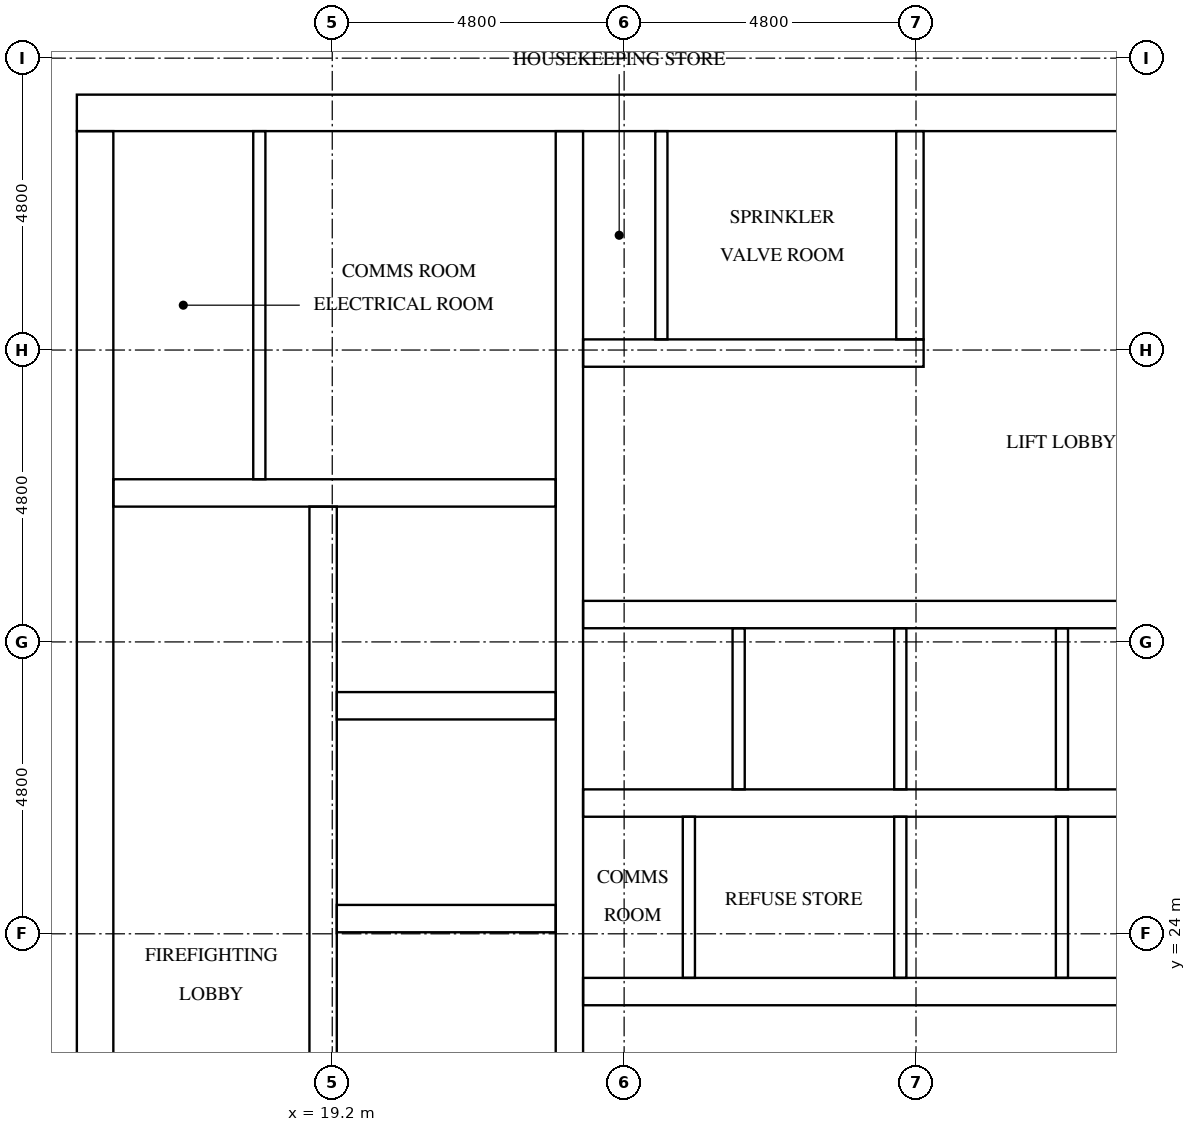
"""IFC4 building model, lengths in metres.
Left out: names, types, materials, properties, quantities, classifications, styles, units other than length and angle.
Written with IfcOpenShell. Run it as: python <this file> out.ifc"""

import sys

from ifc_helpers import new_model, si_unit, direction, frame, frame_2d, origin, place, context, subcontext, project, spatial, rectangle, extrude, element, fill, save


model = new_model("IFC4")
c1 = context("Model", 3, precision=1e-05, world=origin(), true_north=direction((0.0, 1.0)))
c2 = subcontext(c1, "Body", "Model", "MODEL_VIEW")
j1 = project(units=[si_unit("LENGTHUNIT", "METRE"), si_unit("PLANEANGLEUNIT", "RADIAN")], contexts=[c1])
p1 = place(None, origin())
s1 = spatial("IfcSite", under=j1, at=p1, CompositionType="ELEMENT")
p2 = place(p1, origin())
s2 = spatial("IfcBuilding", under=s1, at=p2, CompositionType="ELEMENT")
p3 = place(p2, frame((0.0, 0.0, 245.7)))
s3 = spatial("IfcBuildingStorey", under=s2, at=p3, CompositionType="ELEMENT", Elevation=245.7)
p4 = place(p3, frame((15.0, 37.5, 0.0), z_axis=(0.0, 0.0, 1.0), x_axis=(1.0, 0.0, 0.0)))
e1 = element("IfcWall", 1, at=p4, inside=s3, PredefinedType="SHEAR", context=c2, shape_type="SweptSolid", body=[
    extrude(rectangle(XDim=32.4, YDim=0.6, at=frame_2d((16.2, 0.0))), origin(), (0.0, 0.0, 1.0), 3.2),
])
p5 = place(p4, frame((15.3, 0.0, 0.0)))
e2 = element("IfcOpeningElement", 2, at=p5, cuts=e1, PredefinedType="OPENING", context=c2, shape_type="SweptSolid", body=[
    extrude(rectangle(XDim=1.8, YDim=2.1, at=frame_2d((0.9, 1.05))), frame((0.0, 0.31, 0.0), z_axis=(0.0, -1.0, 0.0), x_axis=(1.0, 0.0, 0.0)), (0.0, 0.0, 1.0), 0.62),
])
p6 = place(p4, frame((1.25, 0.0, 0.0)))
e3 = element("IfcOpeningElement", 3, at=p6, cuts=e1, PredefinedType="OPENING", context=c2, shape_type="SweptSolid", body=[
    extrude(rectangle(XDim=1.0, YDim=2.1, at=frame_2d((0.5, 1.05))), frame((0.0, 0.31, 0.0), z_axis=(0.0, -1.0, 0.0), x_axis=(1.0, 0.0, 0.0)), (0.0, 0.0, 1.0), 0.62),
])
p7 = place(p4, frame((4.988, 0.0, 0.0)))
e4 = element("IfcOpeningElement", 4, at=p7, cuts=e1, PredefinedType="OPENING", context=c2, shape_type="SweptSolid", body=[
    extrude(rectangle(XDim=1.0, YDim=2.1, at=frame_2d((0.5, 1.05))), frame((0.0, 0.31, 0.0), z_axis=(0.0, -1.0, 0.0), x_axis=(1.0, 0.0, 0.0)), (0.0, 0.0, 1.0), 0.62),
])
p8 = place(p3, frame((15.3, 15.6, 0.0), z_axis=(0.0, 0.0, 1.0), x_axis=(0.0, 1.0, 0.0)))
e5 = element("IfcWall", 5, at=p8, inside=s3, PredefinedType="SHEAR", context=c2, shape_type="SweptSolid", body=[
    extrude(rectangle(XDim=21.6, YDim=0.6, at=frame_2d((10.8, 0.0))), origin(), (0.0, 0.0, 1.0), 3.2),
])
p9 = place(p8, frame((5.16, 0.0, 0.0)))
e6 = element("IfcOpeningElement", 6, at=p9, cuts=e5, PredefinedType="OPENING", context=c2, shape_type="SweptSolid", body=[
    extrude(rectangle(XDim=1.2, YDim=2.1, at=frame_2d((0.6, 1.05))), frame((0.0, 0.31, 0.0), z_axis=(0.0, -1.0, 0.0), x_axis=(1.0, 0.0, 0.0)), (0.0, 0.0, 1.0), 0.62),
])
p10 = place(p3, frame((19.05, 15.6, 0.0), z_axis=(0.0, 0.0, 1.0), x_axis=(0.0, 1.0, 0.0)))
e7 = element("IfcWall", 7, at=p10, inside=s3, PredefinedType="SHEAR", context=c2, shape_type="SweptSolid", body=[
    extrude(rectangle(XDim=15.425, YDim=0.45, at=frame_2d((7.712, 0.0))), origin(), (0.0, 0.0, 1.0), 3.2),
])
p11 = place(p10, frame((9.85, 0.0, 0.0)))
e8 = element("IfcOpeningElement", 8, at=p11, cuts=e7, PredefinedType="OPENING", context=c2, shape_type="SweptSolid", body=[
    extrude(rectangle(XDim=1.1, YDim=2.1, at=frame_2d((0.55, 1.05))), frame((0.0, 0.235, 0.0), z_axis=(0.0, -1.0, 0.0), x_axis=(1.0, 0.0, 0.0)), (0.0, 0.0, 1.0), 0.47),
])
p12 = place(p10, frame((13.35, 0.0, 0.0)))
e9 = element("IfcOpeningElement", 9, at=p12, cuts=e7, PredefinedType="OPENING", context=c2, shape_type="SweptSolid", body=[
    extrude(rectangle(XDim=1.1, YDim=2.1, at=frame_2d((0.55, 1.05))), frame((0.0, 0.235, 0.0), z_axis=(0.0, -1.0, 0.0), x_axis=(1.0, 0.0, 0.0)), (0.0, 0.0, 1.0), 0.47),
])
p13 = place(p10, frame((0.6, 0.0, 0.0)))
e10 = element("IfcOpeningElement", 10, at=p13, cuts=e7, PredefinedType="OPENING", context=c2, shape_type="SweptSolid", body=[
    extrude(rectangle(XDim=1.2, YDim=2.1, at=frame_2d((0.6, 1.05))), frame((0.0, 0.235, 0.0), z_axis=(0.0, -1.0, 0.0), x_axis=(1.0, 0.0, 0.0)), (0.0, 0.0, 1.0), 0.47),
])
p14 = place(p3, frame((23.1, 15.6, 0.0), z_axis=(0.0, 0.0, 1.0), x_axis=(0.0, 1.0, 0.0)))
e11 = element("IfcWall", 11, at=p14, inside=s3, PredefinedType="SHEAR", context=c2, shape_type="SweptSolid", body=[
    extrude(rectangle(XDim=21.6, YDim=0.45, at=frame_2d((10.8, 0.0))), origin(), (0.0, 0.0, 1.0), 3.2),
])
for number, where, z_axis, x_axis in (
    (12, (19.275, 24.25, 0.0), (0.0, 0.0, 1.0), (1.0, 0.0, 0.0)),
    (13, (19.275, 27.75, 0.0), (0.0, 0.0, 1.0), (1.0, 0.0, 0.0)),
):
    element("IfcWall", number, at=place(p3, frame(where, z_axis=z_axis, x_axis=x_axis)), inside=s3, PredefinedType="SHEAR", context=c2, shape_type="SweptSolid", body=[
        extrude(rectangle(XDim=3.6, YDim=0.45, at=frame_2d((1.8, 0.0))), origin(), (0.0, 0.0, 1.0), 3.2),
    ])
p15 = place(p3, frame((15.6, 31.25, 0.0), z_axis=(0.0, 0.0, 1.0), x_axis=(1.0, 0.0, 0.0)))
e14 = element("IfcWall", 14, at=p15, inside=s3, PredefinedType="SHEAR", context=c2, shape_type="SweptSolid", body=[
    extrude(rectangle(XDim=7.275, YDim=0.45, at=frame_2d((3.637, 0.0))), origin(), (0.0, 0.0, 1.0), 3.2),
])
p16 = place(p3, frame((23.325, 23.05, 0.0), z_axis=(0.0, 0.0, 1.0), x_axis=(1.0, 0.0, 0.0)))
e15 = element("IfcWall", 15, at=p16, inside=s3, PredefinedType="SHEAR", context=c2, shape_type="SweptSolid", body=[
    extrude(rectangle(XDim=15.75, YDim=0.45, at=frame_2d((7.875, 0.0))), origin(), (0.0, 0.0, 1.0), 3.2),
])
p17 = place(p16, frame((0.32, 0.0, 0.0)))
e16 = element("IfcOpeningElement", 16, at=p17, cuts=e15, PredefinedType="OPENING", context=c2, shape_type="SweptSolid", body=[
    extrude(rectangle(XDim=1.0, YDim=2.1, at=frame_2d((0.5, 1.05))), frame((0.0, 0.235, 0.0), z_axis=(0.0, -1.0, 0.0), x_axis=(1.0, 0.0, 0.0)), (0.0, 0.0, 1.0), 0.47),
])
p18 = place(p16, frame((2.978, 0.0, 0.0)))
e17 = element("IfcOpeningElement", 17, at=p18, cuts=e15, PredefinedType="OPENING", context=c2, shape_type="SweptSolid", body=[
    extrude(rectangle(XDim=1.0, YDim=2.1, at=frame_2d((0.5, 1.05))), frame((0.0, 0.235, 0.0), z_axis=(0.0, -1.0, 0.0), x_axis=(1.0, 0.0, 0.0)), (0.0, 0.0, 1.0), 0.47),
])
p19 = place(p16, frame((10.953, 0.0, 0.0)))
e18 = element("IfcOpeningElement", 18, at=p19, cuts=e15, PredefinedType="OPENING", context=c2, shape_type="SweptSolid", body=[
    extrude(rectangle(XDim=1.0, YDim=2.1, at=frame_2d((0.5, 1.05))), frame((0.0, 0.235, 0.0), z_axis=(0.0, -1.0, 0.0), x_axis=(1.0, 0.0, 0.0)), (0.0, 0.0, 1.0), 0.47),
])
p20 = place(p16, frame((13.612, 0.0, 0.0)))
e19 = element("IfcOpeningElement", 19, at=p20, cuts=e15, PredefinedType="OPENING", context=c2, shape_type="SweptSolid", body=[
    extrude(rectangle(XDim=1.0, YDim=2.1, at=frame_2d((0.5, 1.05))), frame((0.0, 0.235, 0.0), z_axis=(0.0, -1.0, 0.0), x_axis=(1.0, 0.0, 0.0)), (0.0, 0.0, 1.0), 0.47),
])
p21 = place(p3, frame((23.325, 26.15, 0.0), z_axis=(0.0, 0.0, 1.0), x_axis=(1.0, 0.0, 0.0)))
e20 = element("IfcWall", 20, at=p21, inside=s3, PredefinedType="SHEAR", context=c2, shape_type="SweptSolid", body=[
    extrude(rectangle(XDim=15.75, YDim=0.45, at=frame_2d((7.875, 0.0))), origin(), (0.0, 0.0, 1.0), 3.2),
])
p22 = place(p3, frame((23.325, 29.25, 0.0), z_axis=(0.0, 0.0, 1.0), x_axis=(1.0, 0.0, 0.0)))
e21 = element("IfcWall", 21, at=p22, inside=s3, PredefinedType="SHEAR", context=c2, shape_type="SweptSolid", body=[
    extrude(rectangle(XDim=15.75, YDim=0.45, at=frame_2d((7.875, 0.0))), origin(), (0.0, 0.0, 1.0), 3.2),
])
p23 = place(p22, frame((0.679, 0.0, 0.0)))
e22 = element("IfcOpeningElement", 22, at=p23, cuts=e21, PredefinedType="OPENING", context=c2, shape_type="SweptSolid", body=[
    extrude(rectangle(XDim=1.1, YDim=2.1, at=frame_2d((0.55, 1.05))), frame((0.0, 0.235, 0.0), z_axis=(0.0, -1.0, 0.0), x_axis=(1.0, 0.0, 0.0)), (0.0, 0.0, 1.0), 0.47),
])
p24 = place(p22, frame((3.337, 0.0, 0.0)))
e23 = element("IfcOpeningElement", 23, at=p24, cuts=e21, PredefinedType="OPENING", context=c2, shape_type="SweptSolid", body=[
    extrude(rectangle(XDim=1.1, YDim=2.1, at=frame_2d((0.55, 1.05))), frame((0.0, 0.235, 0.0), z_axis=(0.0, -1.0, 0.0), x_axis=(1.0, 0.0, 0.0)), (0.0, 0.0, 1.0), 0.47),
])
p25 = place(p22, frame((5.996, 0.0, 0.0)))
e24 = element("IfcOpeningElement", 24, at=p25, cuts=e21, PredefinedType="OPENING", context=c2, shape_type="SweptSolid", body=[
    extrude(rectangle(XDim=1.1, YDim=2.1, at=frame_2d((0.55, 1.05))), frame((0.0, 0.235, 0.0), z_axis=(0.0, -1.0, 0.0), x_axis=(1.0, 0.0, 0.0)), (0.0, 0.0, 1.0), 0.47),
])
p26 = place(p22, frame((8.654, 0.0, 0.0)))
e25 = element("IfcOpeningElement", 25, at=p26, cuts=e21, PredefinedType="OPENING", context=c2, shape_type="SweptSolid", body=[
    extrude(rectangle(XDim=1.1, YDim=2.1, at=frame_2d((0.55, 1.05))), frame((0.0, 0.235, 0.0), z_axis=(0.0, -1.0, 0.0), x_axis=(1.0, 0.0, 0.0)), (0.0, 0.0, 1.0), 0.47),
])
p27 = place(p22, frame((11.312, 0.0, 0.0)))
e26 = element("IfcOpeningElement", 26, at=p27, cuts=e21, PredefinedType="OPENING", context=c2, shape_type="SweptSolid", body=[
    extrude(rectangle(XDim=1.1, YDim=2.1, at=frame_2d((0.55, 1.05))), frame((0.0, 0.235, 0.0), z_axis=(0.0, -1.0, 0.0), x_axis=(1.0, 0.0, 0.0)), (0.0, 0.0, 1.0), 0.47),
])
p28 = place(p22, frame((13.971, 0.0, 0.0)))
e27 = element("IfcOpeningElement", 27, at=p28, cuts=e21, PredefinedType="OPENING", context=c2, shape_type="SweptSolid", body=[
    extrude(rectangle(XDim=1.1, YDim=2.1, at=frame_2d((0.55, 1.05))), frame((0.0, 0.235, 0.0), z_axis=(0.0, -1.0, 0.0), x_axis=(1.0, 0.0, 0.0)), (0.0, 0.0, 1.0), 0.47),
])
p29 = place(p3, frame((23.325, 33.55, 0.0), z_axis=(0.0, 0.0, 1.0), x_axis=(1.0, 0.0, 0.0)))
e28 = element("IfcWall", 28, at=p29, inside=s3, PredefinedType="SHEAR", context=c2, shape_type="SweptSolid", body=[
    extrude(rectangle(XDim=5.6, YDim=0.45, at=frame_2d((2.8, 0.0))), origin(), (0.0, 0.0, 1.0), 3.2),
])
p30 = place(p29, frame((0.094, 0.0, 0.0)))
e29 = element("IfcOpeningElement", 29, at=p30, cuts=e28, PredefinedType="OPENING", context=c2, shape_type="SweptSolid", body=[
    extrude(rectangle(XDim=1.0, YDim=2.1, at=frame_2d((0.5, 1.05))), frame((0.0, 0.235, 0.0), z_axis=(0.0, -1.0, 0.0), x_axis=(1.0, 0.0, 0.0)), (0.0, 0.0, 1.0), 0.47),
])
p31 = place(p29, frame((2.769, 0.0, 0.0)))
e30 = element("IfcOpeningElement", 30, at=p31, cuts=e28, PredefinedType="OPENING", context=c2, shape_type="SweptSolid", body=[
    extrude(rectangle(XDim=1.0, YDim=2.1, at=frame_2d((0.5, 1.05))), frame((0.0, 0.235, 0.0), z_axis=(0.0, -1.0, 0.0), x_axis=(1.0, 0.0, 0.0)), (0.0, 0.0, 1.0), 0.47),
])
p32 = place(p3, frame((28.7, 33.775, 0.0), z_axis=(0.0, 0.0, 1.0), x_axis=(0.0, 1.0, 0.0)))
e31 = element("IfcWall", 31, at=p32, inside=s3, PredefinedType="SHEAR", context=c2, shape_type="SweptSolid", body=[
    extrude(rectangle(XDim=3.425, YDim=0.45, at=frame_2d((1.712, 0.0))), origin(), (0.0, 0.0, 1.0), 3.2),
])
p33 = place(p3, frame((25.883, 26.375, 0.0), z_axis=(0.0, 0.0, 1.0), x_axis=(0.0, 1.0, 0.0)))
e32 = element("IfcWall", 32, at=p33, inside=s3, PredefinedType="SOLIDWALL", context=c2, shape_type="SweptSolid", body=[
    extrude(rectangle(XDim=2.65, YDim=0.2, at=frame_2d((1.325, 0.0))), origin(), (0.0, 0.0, 1.0), 3.2),
])
p34 = place(p3, frame((28.542, 23.275, 0.0), z_axis=(0.0, 0.0, 1.0), x_axis=(0.0, 1.0, 0.0)))
e33 = element("IfcWall", 33, at=p34, inside=s3, PredefinedType="SOLIDWALL", context=c2, shape_type="SweptSolid", body=[
    extrude(rectangle(XDim=2.65, YDim=0.2, at=frame_2d((1.325, 0.0))), origin(), (0.0, 0.0, 1.0), 3.2),
])
p35 = place(p3, frame((28.542, 26.375, 0.0), z_axis=(0.0, 0.0, 1.0), x_axis=(0.0, 1.0, 0.0)))
e34 = element("IfcWall", 34, at=p35, inside=s3, PredefinedType="SOLIDWALL", context=c2, shape_type="SweptSolid", body=[
    extrude(rectangle(XDim=2.65, YDim=0.2, at=frame_2d((1.325, 0.0))), origin(), (0.0, 0.0, 1.0), 3.2),
])
p36 = place(p3, frame((31.2, 23.275, 0.0), z_axis=(0.0, 0.0, 1.0), x_axis=(0.0, 1.0, 0.0)))
e35 = element("IfcWall", 35, at=p36, inside=s3, PredefinedType="SOLIDWALL", context=c2, shape_type="SweptSolid", body=[
    extrude(rectangle(XDim=2.65, YDim=0.2, at=frame_2d((1.325, 0.0))), origin(), (0.0, 0.0, 1.0), 3.2),
])
p37 = place(p3, frame((31.2, 26.375, 0.0), z_axis=(0.0, 0.0, 1.0), x_axis=(0.0, 1.0, 0.0)))
e36 = element("IfcWall", 36, at=p37, inside=s3, PredefinedType="SOLIDWALL", context=c2, shape_type="SweptSolid", body=[
    extrude(rectangle(XDim=2.65, YDim=0.2, at=frame_2d((1.325, 0.0))), origin(), (0.0, 0.0, 1.0), 3.2),
])
p38 = place(p3, frame((18.001, 31.475, 0.0), z_axis=(0.0, 0.0, 1.0), x_axis=(0.0, 1.0, 0.0)))
e37 = element("IfcWall", 37, at=p38, inside=s3, PredefinedType="PARTITIONING", context=c2, shape_type="SweptSolid", body=[
    extrude(rectangle(XDim=5.725, YDim=0.2, at=frame_2d((2.862, 0.0))), origin(), (0.0, 0.0, 1.0), 3.2),
])
p39 = place(p3, frame((25.065, 23.275, 0.0), z_axis=(0.0, 0.0, 1.0), x_axis=(0.0, 1.0, 0.0)))
e38 = element("IfcWall", 38, at=p39, inside=s3, PredefinedType="PARTITIONING", context=c2, shape_type="SweptSolid", body=[
    extrude(rectangle(XDim=2.65, YDim=0.2, at=frame_2d((1.325, 0.0))), origin(), (0.0, 0.0, 1.0), 3.2),
])
p40 = place(p3, frame((24.613, 33.775, 0.0), z_axis=(0.0, 0.0, 1.0), x_axis=(0.0, 1.0, 0.0)))
e39 = element("IfcWall", 39, at=p40, inside=s3, PredefinedType="PARTITIONING", context=c2, shape_type="SweptSolid", body=[
    extrude(rectangle(XDim=3.425, YDim=0.2, at=frame_2d((1.712, 0.0))), origin(), (0.0, 0.0, 1.0), 3.2),
])
p41 = place(p23, origin())
e40 = element("IfcDoor", 40, at=p41, inside=s3, OperationType="DOUBLE_DOOR_SLIDING", PredefinedType="DOOR", context=c2, shape_type="SweptSolid", body=[
    extrude(rectangle(XDim=1.1, YDim=2.1, at=frame_2d((0.55, 1.05))), frame((0.0, 0.025, 0.0), z_axis=(0.0, -1.0, 0.0), x_axis=(1.0, 0.0, 0.0)), (0.0, 0.0, 1.0), 0.05),
])
fill(e22, e40)
p42 = place(p24, origin())
e41 = element("IfcDoor", 41, at=p42, inside=s3, OperationType="DOUBLE_DOOR_SLIDING", PredefinedType="DOOR", context=c2, shape_type="SweptSolid", body=[
    extrude(rectangle(XDim=1.1, YDim=2.1, at=frame_2d((0.55, 1.05))), frame((0.0, 0.025, 0.0), z_axis=(0.0, -1.0, 0.0), x_axis=(1.0, 0.0, 0.0)), (0.0, 0.0, 1.0), 0.05),
])
fill(e23, e41)
p43 = place(p25, origin())
e42 = element("IfcDoor", 42, at=p43, inside=s3, OperationType="DOUBLE_DOOR_SLIDING", PredefinedType="DOOR", context=c2, shape_type="SweptSolid", body=[
    extrude(rectangle(XDim=1.1, YDim=2.1, at=frame_2d((0.55, 1.05))), frame((0.0, 0.025, 0.0), z_axis=(0.0, -1.0, 0.0), x_axis=(1.0, 0.0, 0.0)), (0.0, 0.0, 1.0), 0.05),
])
fill(e24, e42)
p44 = place(p26, origin())
e43 = element("IfcDoor", 43, at=p44, inside=s3, OperationType="DOUBLE_DOOR_SLIDING", PredefinedType="DOOR", context=c2, shape_type="SweptSolid", body=[
    extrude(rectangle(XDim=1.1, YDim=2.1, at=frame_2d((0.55, 1.05))), frame((0.0, 0.025, 0.0), z_axis=(0.0, -1.0, 0.0), x_axis=(1.0, 0.0, 0.0)), (0.0, 0.0, 1.0), 0.05),
])
fill(e25, e43)
p45 = place(p11, origin())
e44 = element("IfcDoor", 44, at=p45, inside=s3, OperationType="DOUBLE_DOOR_SLIDING", PredefinedType="DOOR", context=c2, shape_type="SweptSolid", body=[
    extrude(rectangle(XDim=1.1, YDim=2.1, at=frame_2d((0.55, 1.05))), frame((0.0, 0.025, 0.0), z_axis=(0.0, -1.0, 0.0), x_axis=(1.0, 0.0, 0.0)), (0.0, 0.0, 1.0), 0.05),
])
fill(e8, e44)
p46 = place(p12, origin())
e45 = element("IfcDoor", 45, at=p46, inside=s3, OperationType="DOUBLE_DOOR_SLIDING", PredefinedType="DOOR", context=c2, shape_type="SweptSolid", body=[
    extrude(rectangle(XDim=1.1, YDim=2.1, at=frame_2d((0.55, 1.05))), frame((0.0, 0.025, 0.0), z_axis=(0.0, -1.0, 0.0), x_axis=(1.0, 0.0, 0.0)), (0.0, 0.0, 1.0), 0.05),
])
fill(e9, e45)
p47 = place(p5, origin())
e46 = element("IfcDoor", 46, at=p47, inside=s3, OperationType="DOUBLE_DOOR_SINGLE_SWING", PredefinedType="DOOR", context=c2, shape_type="SweptSolid", body=[
    extrude(rectangle(XDim=1.8, YDim=2.1, at=frame_2d((0.9, 1.05))), frame((0.0, 0.025, 0.0), z_axis=(0.0, -1.0, 0.0), x_axis=(1.0, 0.0, 0.0)), (0.0, 0.0, 1.0), 0.05),
])
fill(e2, e46)
p48 = place(p6, origin())
e47 = element("IfcDoor", 47, at=p48, inside=s3, OperationType="SINGLE_SWING_LEFT", PredefinedType="DOOR", context=c2, shape_type="SweptSolid", body=[
    extrude(rectangle(XDim=1.0, YDim=2.1, at=frame_2d((0.5, 1.05))), frame((0.0, 0.025, 0.0), z_axis=(0.0, -1.0, 0.0), x_axis=(1.0, 0.0, 0.0)), (0.0, 0.0, 1.0), 0.05),
])
fill(e3, e47)
p49 = place(p7, origin())
e48 = element("IfcDoor", 48, at=p49, inside=s3, OperationType="SINGLE_SWING_RIGHT", PredefinedType="DOOR", context=c2, shape_type="SweptSolid", body=[
    extrude(rectangle(XDim=1.0, YDim=2.1, at=frame_2d((0.5, 1.05))), frame((0.0, 0.025, 0.0), z_axis=(0.0, -1.0, 0.0), x_axis=(1.0, 0.0, 0.0)), (0.0, 0.0, 1.0), 0.05),
])
fill(e4, e48)
p50 = place(p17, frame((1.0, 0.0, 0.0), z_axis=(0.0, 0.0, 1.0), x_axis=(-1.0, 0.0, 0.0)))
e49 = element("IfcDoor", 49, at=p50, inside=s3, OperationType="SINGLE_SWING_LEFT", PredefinedType="DOOR", context=c2, shape_type="SweptSolid", body=[
    extrude(rectangle(XDim=1.0, YDim=2.1, at=frame_2d((0.5, 1.05))), frame((0.0, 0.025, 0.0), z_axis=(0.0, -1.0, 0.0), x_axis=(1.0, 0.0, 0.0)), (0.0, 0.0, 1.0), 0.05),
])
fill(e16, e49)
p51 = place(p18, frame((1.0, 0.0, 0.0), z_axis=(0.0, 0.0, 1.0), x_axis=(-1.0, 0.0, 0.0)))
e50 = element("IfcDoor", 50, at=p51, inside=s3, OperationType="SINGLE_SWING_RIGHT", PredefinedType="DOOR", context=c2, shape_type="SweptSolid", body=[
    extrude(rectangle(XDim=1.0, YDim=2.1, at=frame_2d((0.5, 1.05))), frame((0.0, 0.025, 0.0), z_axis=(0.0, -1.0, 0.0), x_axis=(1.0, 0.0, 0.0)), (0.0, 0.0, 1.0), 0.05),
])
fill(e17, e50)
p52 = place(p30, frame((1.0, 0.0, 0.0), z_axis=(0.0, 0.0, 1.0), x_axis=(-1.0, 0.0, 0.0)))
e51 = element("IfcDoor", 51, at=p52, inside=s3, OperationType="SINGLE_SWING_LEFT", PredefinedType="DOOR", context=c2, shape_type="SweptSolid", body=[
    extrude(rectangle(XDim=1.0, YDim=2.1, at=frame_2d((0.5, 1.05))), frame((0.0, 0.025, 0.0), z_axis=(0.0, -1.0, 0.0), x_axis=(1.0, 0.0, 0.0)), (0.0, 0.0, 1.0), 0.05),
])
fill(e29, e51)
p53 = place(p31, frame((1.0, 0.0, 0.0), z_axis=(0.0, 0.0, 1.0), x_axis=(-1.0, 0.0, 0.0)))
e52 = element("IfcDoor", 52, at=p53, inside=s3, OperationType="SINGLE_SWING_RIGHT", PredefinedType="DOOR", context=c2, shape_type="SweptSolid", body=[
    extrude(rectangle(XDim=1.0, YDim=2.1, at=frame_2d((0.5, 1.05))), frame((0.0, 0.025, 0.0), z_axis=(0.0, -1.0, 0.0), x_axis=(1.0, 0.0, 0.0)), (0.0, 0.0, 1.0), 0.05),
])
fill(e30, e52)
save(model, sys.argv[1])
